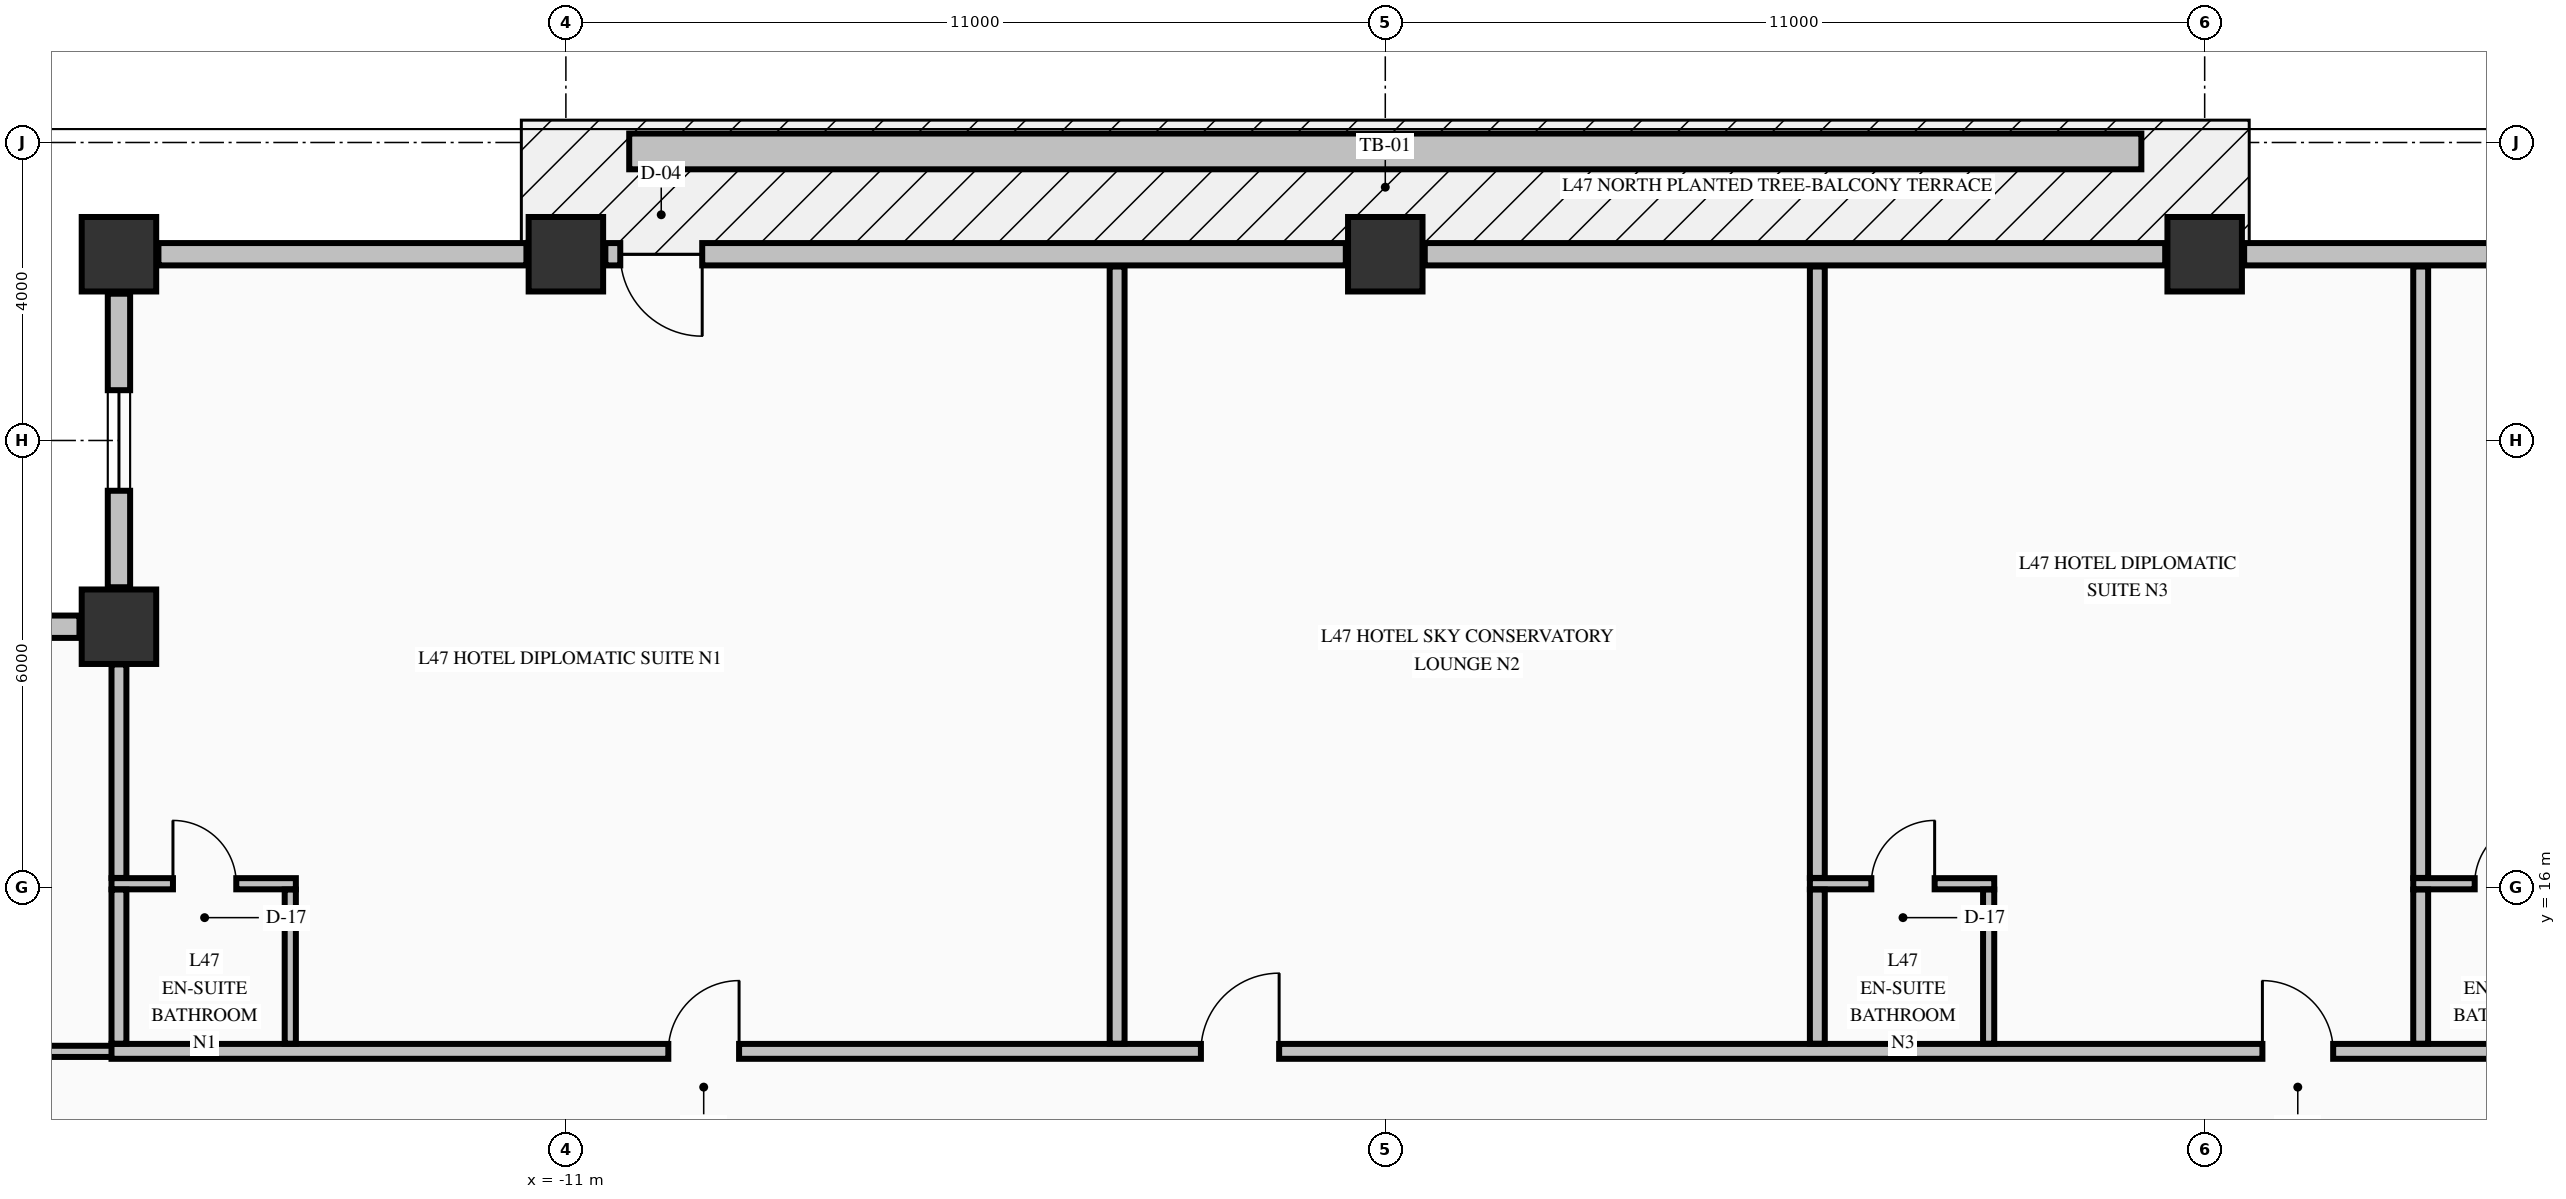
"""IFC4 building model, lengths in metres.
Left out: names, types, materials, properties, quantities, classifications, styles, units other than length and angle.
Written with IfcOpenShell. Run it as: python <this file> out.ifc"""

import sys

from ifc_helpers import new_model, si_unit, direction, frame, frame_2d, origin, origin_2d, place, context, subcontext, project, spatial, rectangle, extrude, element, fill, save


model = new_model("IFC4")
c1 = context("Model", 3, precision=1e-05, world=origin(), true_north=direction((0.0, 1.0)))
c2 = subcontext(c1, "Body", "Model", "MODEL_VIEW")
j1 = project(units=[si_unit("LENGTHUNIT", "METRE"), si_unit("PLANEANGLEUNIT", "RADIAN")], contexts=[c1])
p1 = place(None, origin())
s1 = spatial("IfcSite", under=j1, at=p1, CompositionType="ELEMENT")
p2 = place(p1, origin())
s2 = spatial("IfcBuilding", under=s1, at=p2, CompositionType="ELEMENT")
p3 = place(p2, frame((0.0, 0.0, 183.06)))
s3 = spatial("IfcBuildingStorey", under=s2, at=p3, CompositionType="ELEMENT", Elevation=183.06)
for number, where, z_axis, x_axis in (
    (1, (-17.0, 24.5, -0.25), (0.0, 0.0, 1.0), (1.0, 0.0, 0.0)),
    (2, (-11.0, 24.5, -0.25), (0.0, 0.0, 1.0), (1.0, 0.0, 0.0)),
    (3, (0.0, 24.5, -0.25), (0.0, 0.0, 1.0), (1.0, 0.0, 0.0)),
    (4, (11.0, 24.5, -0.25), (0.0, 0.0, 1.0), (1.0, 0.0, 0.0)),
    (5, (-17.0, 19.5, -0.25), (0.0, 0.0, 1.0), (1.0, 0.0, 0.0)),
):
    element("IfcColumn", number, at=place(p3, frame(where, z_axis=z_axis, x_axis=x_axis)), inside=s3, PredefinedType="COLUMN", context=c2, shape_type="SweptSolid", body=[
        extrude(rectangle(XDim=1.0, YDim=1.0, at=origin_2d()), origin(), (0.0, 0.0, 1.0), 3.225),
    ])
p4 = place(p3, frame((-17.0, 23.97, 0.0), z_axis=(0.0, 0.0, 1.0), x_axis=(0.0, -1.0, 0.0)))
e6 = element("IfcWall", 6, at=p4, inside=s3, PredefinedType="STANDARD", context=c2, shape_type="SweptSolid", body=[
    extrude(rectangle(XDim=3.94, YDim=0.3, at=frame_2d((1.97, 0.0))), origin(), (0.0, 0.0, 1.0), 2.367),
])
p5 = place(p4, frame((1.295, 0.0, 0.68)))
e7 = element("IfcOpeningElement", 7, at=p5, cuts=e6, PredefinedType="OPENING", context=c2, shape_type="SweptSolid", body=[
    extrude(rectangle(XDim=1.35, YDim=1.42, at=frame_2d((0.675, 0.71))), frame((0.0, 0.16, 0.0), z_axis=(0.0, -1.0, 0.0), x_axis=(1.0, 0.0, 0.0)), (0.0, 0.0, 1.0), 0.32),
])
p6 = place(p3, frame((-17.53, 19.5, 0.0), z_axis=(0.0, 0.0, 1.0), x_axis=(-1.0, 0.0, 0.0)))
e8 = element("IfcWall", 8, at=p6, inside=s3, PredefinedType="STANDARD", context=c2, shape_type="SweptSolid", body=[
    extrude(rectangle(XDim=3.94, YDim=0.3, at=frame_2d((1.97, 0.0))), origin(), (0.0, 0.0, 1.0), 2.367),
])
p7 = place(p6, frame((1.295, 0.0, 0.68)))
e9 = element("IfcOpeningElement", 9, at=p7, cuts=e8, PredefinedType="OPENING", context=c2, shape_type="SweptSolid", body=[
    extrude(rectangle(XDim=1.35, YDim=1.42, at=frame_2d((0.675, 0.71))), frame((0.0, 0.16, 0.0), z_axis=(0.0, -1.0, 0.0), x_axis=(1.0, 0.0, 0.0)), (0.0, 0.0, 1.0), 0.32),
])
p8 = place(p3, frame((-11.53, 24.5, 0.0), z_axis=(0.0, 0.0, 1.0), x_axis=(-1.0, 0.0, 0.0)))
e10 = element("IfcWall", 10, at=p8, inside=s3, PredefinedType="STANDARD", context=c2, shape_type="SweptSolid", body=[
    extrude(rectangle(XDim=4.94, YDim=0.3, at=frame_2d((2.47, 0.0))), origin(), (0.0, 0.0, 1.0), 2.367),
])
p9 = place(p3, frame((-0.53, 24.5, 0.0), z_axis=(0.0, 0.0, 1.0), x_axis=(-1.0, 0.0, 0.0)))
e11 = element("IfcWall", 11, at=p9, inside=s3, PredefinedType="STANDARD", context=c2, shape_type="SweptSolid", body=[
    extrude(rectangle(XDim=9.94, YDim=0.3, at=frame_2d((4.97, 0.0))), origin(), (0.0, 0.0, 1.0), 2.367),
])
p10 = place(p9, frame((8.64, 0.0, 0.0)))
e12 = element("IfcOpeningElement", 12, at=p10, cuts=e11, PredefinedType="OPENING", context=c2, shape_type="SweptSolid", body=[
    extrude(rectangle(XDim=1.1, YDim=2.15, at=frame_2d((0.55, 1.075))), frame((0.0, 0.16, 0.0), z_axis=(0.0, -1.0, 0.0), x_axis=(1.0, 0.0, 0.0)), (0.0, 0.0, 1.0), 0.32),
])
for number, where, z_axis, x_axis in (
    (13, (10.47, 24.5, 0.0), (0.0, 0.0, 1.0), (-1.0, 0.0, 0.0)),
    (14, (21.47, 24.5, 0.0), (0.0, 0.0, 1.0), (-1.0, 0.0, 0.0)),
):
    element("IfcWall", number, at=place(p3, frame(where, z_axis=z_axis, x_axis=x_axis)), inside=s3, PredefinedType="STANDARD", context=c2, shape_type="SweptSolid", body=[
        extrude(rectangle(XDim=9.94, YDim=0.3, at=frame_2d((4.97, 0.0))), origin(), (0.0, 0.0, 1.0), 2.367),
    ])
p11 = place(p3, frame((-20.075, 13.8, 0.0), z_axis=(0.0, 0.0, 1.0), x_axis=(1.0, 0.0, 0.0)))
e15 = element("IfcWall", 15, at=p11, inside=s3, PredefinedType="PARTITIONING", context=c2, shape_type="SweptSolid", body=[
    extrude(rectangle(XDim=3.175, YDim=0.15, at=frame_2d((1.587, 0.0))), origin(), (0.0, 0.0, 1.0), 2.975),
])
p12 = place(p3, frame((-17.1, 13.8, 0.0), z_axis=(0.0, 0.0, 1.0), x_axis=(1.0, 0.0, 0.0)))
e16 = element("IfcWall", 16, at=p12, inside=s3, PredefinedType="PARTITIONING", context=c2, shape_type="SweptSolid", body=[
    extrude(rectangle(XDim=39.2, YDim=0.2, at=frame_2d((19.6, 0.0))), origin(), (0.0, 0.0, 1.0), 2.975),
])
p13 = place(p12, frame((7.475, 0.0, 0.0)))
e17 = element("IfcOpeningElement", 17, at=p13, cuts=e16, PredefinedType="OPENING", context=c2, shape_type="SweptSolid", body=[
    extrude(rectangle(XDim=0.95, YDim=2.15, at=frame_2d((0.475, 1.075))), frame((0.0, 0.11, 0.0), z_axis=(0.0, -1.0, 0.0), x_axis=(1.0, 0.0, 0.0)), (0.0, 0.0, 1.0), 0.22),
])
p14 = place(p12, frame((14.625, 0.0, 0.0)))
e18 = element("IfcOpeningElement", 18, at=p14, cuts=e16, PredefinedType="OPENING", context=c2, shape_type="SweptSolid", body=[
    extrude(rectangle(XDim=1.05, YDim=2.15, at=frame_2d((0.525, 1.075))), frame((0.0, 0.11, 0.0), z_axis=(0.0, -1.0, 0.0), x_axis=(1.0, 0.0, 0.0)), (0.0, 0.0, 1.0), 0.22),
])
p15 = place(p12, frame((28.875, 0.0, 0.0)))
e19 = element("IfcOpeningElement", 19, at=p15, cuts=e16, PredefinedType="OPENING", context=c2, shape_type="SweptSolid", body=[
    extrude(rectangle(XDim=0.95, YDim=2.15, at=frame_2d((0.475, 1.075))), frame((0.0, 0.11, 0.0), z_axis=(0.0, -1.0, 0.0), x_axis=(1.0, 0.0, 0.0)), (0.0, 0.0, 1.0), 0.22),
])
p16 = place(p12, frame((34.625, 0.0, 0.0)))
e20 = element("IfcOpeningElement", 20, at=p16, cuts=e16, PredefinedType="OPENING", context=c2, shape_type="SweptSolid", body=[
    extrude(rectangle(XDim=0.95, YDim=2.15, at=frame_2d((0.475, 1.075))), frame((0.0, 0.11, 0.0), z_axis=(0.0, -1.0, 0.0), x_axis=(1.0, 0.0, 0.0)), (0.0, 0.0, 1.0), 0.22),
])
p17 = place(p3, frame((-17.1, 16.05, 0.0), z_axis=(0.0, 0.0, 1.0), x_axis=(1.0, 0.0, 0.0)))
e21 = element("IfcWall", 21, at=p17, inside=s3, PredefinedType="PARTITIONING", context=c2, shape_type="SweptSolid", body=[
    extrude(rectangle(XDim=2.475, YDim=0.15, at=frame_2d((1.238, 0.0))), origin(), (0.0, 0.0, 1.0), 2.975),
])
p18 = place(p17, frame((0.825, 0.0, 0.0)))
e22 = element("IfcOpeningElement", 22, at=p18, cuts=e21, PredefinedType="OPENING", context=c2, shape_type="SweptSolid", body=[
    extrude(rectangle(XDim=0.85, YDim=2.1, at=frame_2d((0.425, 1.05))), frame((0.0, 0.085, 0.0), z_axis=(0.0, -1.0, 0.0), x_axis=(1.0, 0.0, 0.0)), (0.0, 0.0, 1.0), 0.17),
])
p19 = place(p3, frame((5.7, 16.05, 0.0), z_axis=(0.0, 0.0, 1.0), x_axis=(1.0, 0.0, 0.0)))
e23 = element("IfcWall", 23, at=p19, inside=s3, PredefinedType="PARTITIONING", context=c2, shape_type="SweptSolid", body=[
    extrude(rectangle(XDim=2.475, YDim=0.15, at=frame_2d((1.238, 0.0))), origin(), (0.0, 0.0, 1.0), 2.975),
])
p20 = place(p19, frame((0.825, 0.0, 0.0)))
e24 = element("IfcOpeningElement", 24, at=p20, cuts=e23, PredefinedType="OPENING", context=c2, shape_type="SweptSolid", body=[
    extrude(rectangle(XDim=0.85, YDim=2.1, at=frame_2d((0.425, 1.05))), frame((0.0, 0.085, 0.0), z_axis=(0.0, -1.0, 0.0), x_axis=(1.0, 0.0, 0.0)), (0.0, 0.0, 1.0), 0.17),
])
p21 = place(p3, frame((13.8, 16.05, 0.0), z_axis=(0.0, 0.0, 1.0), x_axis=(1.0, 0.0, 0.0)))
e25 = element("IfcWall", 25, at=p21, inside=s3, PredefinedType="PARTITIONING", context=c2, shape_type="SweptSolid", body=[
    extrude(rectangle(XDim=2.475, YDim=0.15, at=frame_2d((1.237, 0.0))), origin(), (0.0, 0.0, 1.0), 2.975),
])
p22 = place(p21, frame((0.825, 0.0, 0.0)))
e26 = element("IfcOpeningElement", 26, at=p22, cuts=e25, PredefinedType="OPENING", context=c2, shape_type="SweptSolid", body=[
    extrude(rectangle(XDim=0.85, YDim=2.1, at=frame_2d((0.425, 1.05))), frame((0.0, 0.085, 0.0), z_axis=(0.0, -1.0, 0.0), x_axis=(1.0, 0.0, 0.0)), (0.0, 0.0, 1.0), 0.17),
])
p23 = place(p3, frame((-17.0, 13.903, 0.0), z_axis=(0.0, 0.0, 1.0), x_axis=(0.0, 1.0, 0.0)))
e27 = element("IfcWall", 27, at=p23, inside=s3, PredefinedType="PARTITIONING", context=c2, shape_type="SweptSolid", body=[
    extrude(rectangle(XDim=2.069, YDim=0.2, at=frame_2d((1.034, 0.0))), origin(), (0.0, 0.0, 1.0), 2.975),
])
p24 = place(p3, frame((-17.0, 16.128, 0.0), z_axis=(0.0, 0.0, 1.0), x_axis=(0.0, 1.0, 0.0)))
e28 = element("IfcWall", 28, at=p24, inside=s3, PredefinedType="PARTITIONING", context=c2, shape_type="SweptSolid", body=[
    extrude(rectangle(XDim=2.866, YDim=0.2, at=frame_2d((1.433, 0.0))), origin(), (0.0, 0.0, 1.0), 2.975),
])
p25 = place(p3, frame((-14.7, 13.903, 0.0), z_axis=(0.0, 0.0, 1.0), x_axis=(0.0, 1.0, 0.0)))
e29 = element("IfcWall", 29, at=p25, inside=s3, PredefinedType="PARTITIONING", context=c2, shape_type="SweptSolid", body=[
    extrude(rectangle(XDim=2.069, YDim=0.15, at=frame_2d((1.034, 0.0))), origin(), (0.0, 0.0, 1.0), 2.975),
])
p26 = place(p3, frame((-3.6, 13.903, 0.0), z_axis=(0.0, 0.0, 1.0), x_axis=(0.0, 1.0, 0.0)))
e30 = element("IfcWall", 30, at=p26, inside=s3, PredefinedType="PARTITIONING", context=c2, shape_type="SweptSolid", body=[
    extrude(rectangle(XDim=10.432, YDim=0.2, at=frame_2d((5.216, 0.0))), origin(), (0.0, 0.0, 1.0), 2.975),
])
p27 = place(p3, frame((5.8, 13.903, 0.0), z_axis=(0.0, 0.0, 1.0), x_axis=(0.0, 1.0, 0.0)))
e31 = element("IfcWall", 31, at=p27, inside=s3, PredefinedType="PARTITIONING", context=c2, shape_type="SweptSolid", body=[
    extrude(rectangle(XDim=2.069, YDim=0.2, at=frame_2d((1.034, 0.0))), origin(), (0.0, 0.0, 1.0), 2.975),
])
p28 = place(p3, frame((5.8, 16.128, 0.0), z_axis=(0.0, 0.0, 1.0), x_axis=(0.0, 1.0, 0.0)))
e32 = element("IfcWall", 32, at=p28, inside=s3, PredefinedType="PARTITIONING", context=c2, shape_type="SweptSolid", body=[
    extrude(rectangle(XDim=8.207, YDim=0.2, at=frame_2d((4.104, 0.0))), origin(), (0.0, 0.0, 1.0), 2.975),
])
p29 = place(p3, frame((8.1, 13.903, 0.0), z_axis=(0.0, 0.0, 1.0), x_axis=(0.0, 1.0, 0.0)))
e33 = element("IfcWall", 33, at=p29, inside=s3, PredefinedType="PARTITIONING", context=c2, shape_type="SweptSolid", body=[
    extrude(rectangle(XDim=2.069, YDim=0.15, at=frame_2d((1.034, 0.0))), origin(), (0.0, 0.0, 1.0), 2.975),
])
p30 = place(p3, frame((13.9, 13.903, 0.0), z_axis=(0.0, 0.0, 1.0), x_axis=(0.0, 1.0, 0.0)))
e34 = element("IfcWall", 34, at=p30, inside=s3, PredefinedType="PARTITIONING", context=c2, shape_type="SweptSolid", body=[
    extrude(rectangle(XDim=2.069, YDim=0.2, at=frame_2d((1.034, 0.0))), origin(), (0.0, 0.0, 1.0), 2.975),
])
p31 = place(p3, frame((13.9, 16.128, 0.0), z_axis=(0.0, 0.0, 1.0), x_axis=(0.0, 1.0, 0.0)))
e35 = element("IfcWall", 35, at=p31, inside=s3, PredefinedType="PARTITIONING", context=c2, shape_type="SweptSolid", body=[
    extrude(rectangle(XDim=8.207, YDim=0.2, at=frame_2d((4.104, 0.0))), origin(), (0.0, 0.0, 1.0), 2.975),
])
p32 = place(p3, frame((-10.15, 25.88, -0.04), z_axis=(0.0, 0.0, 1.0), x_axis=(1.0, 0.0, 0.0)))
e36 = element("IfcWall", 36, at=p32, inside=s3, PredefinedType="PARAPET", context=c2, shape_type="SweptSolid", body=[
    extrude(rectangle(XDim=20.3, YDim=0.48, at=frame_2d((10.15, 0.0))), origin(), (0.0, 0.0, 1.0), 0.52),
])
p33 = place(p5, origin())
e37 = element("IfcWindow", 37, at=p33, inside=s3, PartitioningType="SINGLE_PANEL", PredefinedType="WINDOW", context=c2, shape_type="SweptSolid", body=[
    extrude(rectangle(XDim=1.35, YDim=1.42, at=frame_2d((0.675, 0.71))), frame((0.0, 0.03, 0.0), z_axis=(0.0, -1.0, 0.0), x_axis=(1.0, 0.0, 0.0)), (0.0, 0.0, 1.0), 0.06),
])
fill(e7, e37)
p34 = place(p10, origin())
e38 = element("IfcDoor", 38, at=p34, inside=s3, OperationType="SINGLE_SWING_LEFT", PredefinedType="DOOR", context=c2, shape_type="SweptSolid", body=[
    extrude(rectangle(XDim=1.1, YDim=2.15, at=frame_2d((0.55, 1.075))), frame((0.0, 0.025, 0.0), z_axis=(0.0, -1.0, 0.0), x_axis=(1.0, 0.0, 0.0)), (0.0, 0.0, 1.0), 0.05),
])
fill(e12, e38)
p35 = place(p13, origin())
e39 = element("IfcDoor", 39, at=p35, inside=s3, OperationType="SINGLE_SWING_RIGHT", PredefinedType="DOOR", context=c2, shape_type="SweptSolid", body=[
    extrude(rectangle(XDim=0.95, YDim=2.15, at=frame_2d((0.475, 1.075))), frame((0.0, 0.025, 0.0), z_axis=(0.0, -1.0, 0.0), x_axis=(1.0, 0.0, 0.0)), (0.0, 0.0, 1.0), 0.05),
])
fill(e17, e39)
p36 = place(p18, origin())
e40 = element("IfcDoor", 40, at=p36, inside=s3, OperationType="SINGLE_SWING_LEFT", PredefinedType="DOOR", context=c2, shape_type="SweptSolid", body=[
    extrude(rectangle(XDim=0.85, YDim=2.1, at=frame_2d((0.425, 1.05))), frame((0.0, 0.025, 0.0), z_axis=(0.0, -1.0, 0.0), x_axis=(1.0, 0.0, 0.0)), (0.0, 0.0, 1.0), 0.05),
])
fill(e22, e40)
p37 = place(p14, origin())
e41 = element("IfcDoor", 41, at=p37, inside=s3, OperationType="SINGLE_SWING_RIGHT", PredefinedType="DOOR", context=c2, shape_type="SweptSolid", body=[
    extrude(rectangle(XDim=1.05, YDim=2.15, at=frame_2d((0.525, 1.075))), frame((0.0, 0.025, 0.0), z_axis=(0.0, -1.0, 0.0), x_axis=(1.0, 0.0, 0.0)), (0.0, 0.0, 1.0), 0.05),
])
fill(e18, e41)
p38 = place(p15, origin())
e42 = element("IfcDoor", 42, at=p38, inside=s3, OperationType="SINGLE_SWING_LEFT", PredefinedType="DOOR", context=c2, shape_type="SweptSolid", body=[
    extrude(rectangle(XDim=0.95, YDim=2.15, at=frame_2d((0.475, 1.075))), frame((0.0, 0.025, 0.0), z_axis=(0.0, -1.0, 0.0), x_axis=(1.0, 0.0, 0.0)), (0.0, 0.0, 1.0), 0.05),
])
fill(e19, e42)
p39 = place(p20, origin())
e43 = element("IfcDoor", 43, at=p39, inside=s3, OperationType="SINGLE_SWING_RIGHT", PredefinedType="DOOR", context=c2, shape_type="SweptSolid", body=[
    extrude(rectangle(XDim=0.85, YDim=2.1, at=frame_2d((0.425, 1.05))), frame((0.0, 0.025, 0.0), z_axis=(0.0, -1.0, 0.0), x_axis=(1.0, 0.0, 0.0)), (0.0, 0.0, 1.0), 0.05),
])
fill(e24, e43)
p40 = place(p22, origin())
e44 = element("IfcDoor", 44, at=p40, inside=s3, OperationType="SINGLE_SWING_RIGHT", PredefinedType="DOOR", context=c2, shape_type="SweptSolid", body=[
    extrude(rectangle(XDim=0.85, YDim=2.1, at=frame_2d((0.425, 1.05))), frame((0.0, 0.025, 0.0), z_axis=(0.0, -1.0, 0.0), x_axis=(1.0, 0.0, 0.0)), (0.0, 0.0, 1.0), 0.05),
])
fill(e26, e44)
save(model, sys.argv[1])
